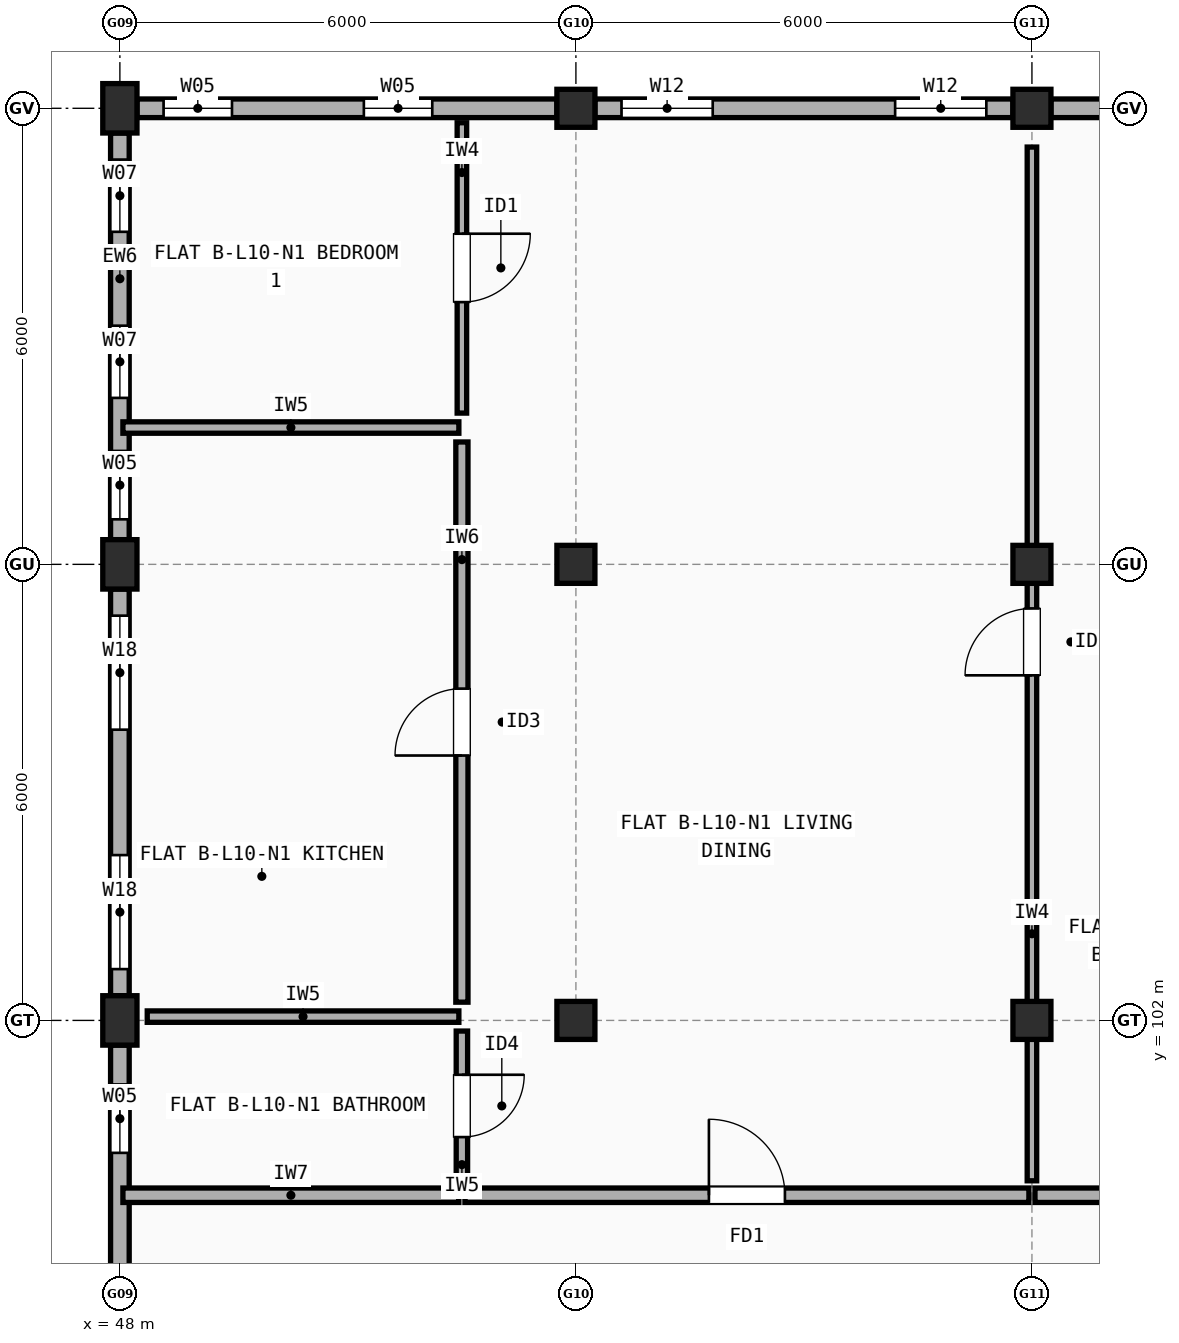
"""IFC4 building model, lengths in metres.
Left out: names, types, materials, properties, quantities, classifications, styles, units other than length and angle.
Written with IfcOpenShell. Run it as: python <this file> out.ifc"""

import sys

from ifc_helpers import new_model, si_unit, direction, frame, frame_2d, origin, origin_2d, place, context, subcontext, project, spatial, rectangle, extrude, element, fill, save


model = new_model("IFC4")
c1 = context("Model", 3, precision=1e-05, world=origin(), true_north=direction((0.0, 1.0)))
c2 = subcontext(c1, "Body", "Model", "MODEL_VIEW")
j1 = project(units=[si_unit("LENGTHUNIT", "METRE"), si_unit("PLANEANGLEUNIT", "RADIAN")], contexts=[c1])
p1 = place(None, origin())
s1 = spatial("IfcSite", under=j1, at=p1, CompositionType="ELEMENT")
p2 = place(p1, origin())
s2 = spatial("IfcBuilding", under=s1, at=p2, CompositionType="ELEMENT")
p3 = place(p2, frame((0.0, 0.0, 33.3)))
s3 = spatial("IfcBuildingStorey", under=s2, at=p3, CompositionType="ELEMENT", Elevation=33.3)
for number, where, z_axis, x_axis in (
    (1, (48.0, 102.0, 0.0), (0.0, 0.0, 1.0), (1.0, 0.0, 0.0)),
    (2, (48.0, 108.0, 0.0), (0.0, 0.0, 1.0), (1.0, 0.0, 0.0)),
    (3, (48.0, 114.0, 0.0), (0.0, 0.0, 1.0), (1.0, 0.0, 0.0)),
):
    element("IfcColumn", number, at=place(p3, frame(where, z_axis=z_axis, x_axis=x_axis)), inside=s3, PredefinedType="COLUMN", context=c2, shape_type="SweptSolid", body=[
        extrude(rectangle(XDim=0.45, YDim=0.65, at=origin_2d()), origin(), (0.0, 0.0, 1.0), 2.99),
    ])
for number, where, z_axis, x_axis in (
    (4, (54.0, 102.0, 0.0), (0.0, 0.0, 1.0), (1.0, 0.0, 0.0)),
    (5, (54.0, 108.0, 0.0), (0.0, 0.0, 1.0), (1.0, 0.0, 0.0)),
    (6, (54.0, 114.0, 0.0), (0.0, 0.0, 1.0), (1.0, 0.0, 0.0)),
    (7, (60.0, 102.0, 0.0), (0.0, 0.0, 1.0), (1.0, 0.0, 0.0)),
    (8, (60.0, 108.0, 0.0), (0.0, 0.0, 1.0), (1.0, 0.0, 0.0)),
    (9, (60.0, 114.0, 0.0), (0.0, 0.0, 1.0), (1.0, 0.0, 0.0)),
):
    element("IfcColumn", number, at=place(p3, frame(where, z_axis=z_axis, x_axis=x_axis)), inside=s3, PredefinedType="COLUMN", context=c2, shape_type="SweptSolid", body=[
        extrude(rectangle(XDim=0.5, YDim=0.5, at=origin_2d()), origin(), (0.0, 0.0, 1.0), 2.99),
    ])
p4 = place(p3, frame((65.75, 114.0, 0.0), z_axis=(0.0, 0.0, 1.0), x_axis=(-1.0, 0.0, 0.0)))
e10 = element("IfcWall", 10, at=p4, inside=s3, PredefinedType="STANDARD", context=c2, shape_type="SweptSolid", body=[
    extrude(rectangle(XDim=5.5, YDim=0.245, at=frame_2d((2.75, 0.0))), origin(), (0.0, 0.0, 1.0), 2.472),
])
p5 = place(p4, frame((0.855, 0.0, 0.9)))
e11 = element("IfcOpeningElement", 11, at=p5, cuts=e10, PredefinedType="OPENING", context=c2, shape_type="SweptSolid", body=[
    extrude(rectangle(XDim=1.0, YDim=1.4, at=frame_2d((0.5, 0.7))), frame((0.0, 0.133, 0.0), z_axis=(0.0, -1.0, 0.0), x_axis=(1.0, 0.0, 0.0)), (0.0, 0.0, 1.0), 0.265),
])
p6 = place(p4, frame((3.62, 0.0, 0.9)))
e12 = element("IfcOpeningElement", 12, at=p6, cuts=e10, PredefinedType="OPENING", context=c2, shape_type="SweptSolid", body=[
    extrude(rectangle(XDim=1.05, YDim=1.35, at=frame_2d((0.525, 0.675))), frame((0.0, 0.133, 0.0), z_axis=(0.0, -1.0, 0.0), x_axis=(1.0, 0.0, 0.0)), (0.0, 0.0, 1.0), 0.265),
])
p7 = place(p3, frame((59.75, 114.0, 0.0), z_axis=(0.0, 0.0, 1.0), x_axis=(-1.0, 0.0, 0.0)))
e13 = element("IfcWall", 13, at=p7, inside=s3, PredefinedType="STANDARD", context=c2, shape_type="SweptSolid", body=[
    extrude(rectangle(XDim=5.5, YDim=0.245, at=frame_2d((2.75, 0.0))), origin(), (0.0, 0.0, 1.0), 2.472),
])
p8 = place(p7, frame((0.35, 0.0, 0.9)))
e14 = element("IfcOpeningElement", 14, at=p8, cuts=e13, PredefinedType="OPENING", context=c2, shape_type="SweptSolid", body=[
    extrude(rectangle(XDim=1.2, YDim=1.35, at=frame_2d((0.6, 0.675))), frame((0.0, 0.133, 0.0), z_axis=(0.0, -1.0, 0.0), x_axis=(1.0, 0.0, 0.0)), (0.0, 0.0, 1.0), 0.265),
])
p9 = place(p7, frame((3.95, 0.0, 0.9)))
e15 = element("IfcOpeningElement", 15, at=p9, cuts=e13, PredefinedType="OPENING", context=c2, shape_type="SweptSolid", body=[
    extrude(rectangle(XDim=1.2, YDim=1.35, at=frame_2d((0.6, 0.675))), frame((0.0, 0.133, 0.0), z_axis=(0.0, -1.0, 0.0), x_axis=(1.0, 0.0, 0.0)), (0.0, 0.0, 1.0), 0.265),
])
p10 = place(p3, frame((53.75, 114.0, 0.0), z_axis=(0.0, 0.0, 1.0), x_axis=(-1.0, 0.0, 0.0)))
e16 = element("IfcWall", 16, at=p10, inside=s3, PredefinedType="STANDARD", context=c2, shape_type="SweptSolid", body=[
    extrude(rectangle(XDim=5.525, YDim=0.245, at=frame_2d((2.762, 0.0))), origin(), (0.0, 0.0, 1.0), 2.472),
])
p11 = place(p10, frame((1.64, 0.0, 0.9)))
e17 = element("IfcOpeningElement", 17, at=p11, cuts=e16, PredefinedType="OPENING", context=c2, shape_type="SweptSolid", body=[
    extrude(rectangle(XDim=0.9, YDim=1.4, at=frame_2d((0.45, 0.7))), frame((0.0, 0.133, 0.0), z_axis=(0.0, -1.0, 0.0), x_axis=(1.0, 0.0, 0.0)), (0.0, 0.0, 1.0), 0.265),
])
p12 = place(p10, frame((4.275, 0.0, 0.9)))
e18 = element("IfcOpeningElement", 18, at=p12, cuts=e16, PredefinedType="OPENING", context=c2, shape_type="SweptSolid", body=[
    extrude(rectangle(XDim=0.9, YDim=1.4, at=frame_2d((0.45, 0.7))), frame((0.0, 0.133, 0.0), z_axis=(0.0, -1.0, 0.0), x_axis=(1.0, 0.0, 0.0)), (0.0, 0.0, 1.0), 0.265),
])
p13 = place(p3, frame((48.0, 113.675, 0.0), z_axis=(0.0, 0.0, 1.0), x_axis=(0.0, -1.0, 0.0)))
e19 = element("IfcWall", 19, at=p13, inside=s3, PredefinedType="STANDARD", context=c2, shape_type="SweptSolid", body=[
    extrude(rectangle(XDim=5.35, YDim=0.245, at=frame_2d((2.675, 0.0))), origin(), (0.0, 0.0, 1.0), 2.472),
])
p14 = place(p13, frame((0.35, 0.0, 0.9)))
e20 = element("IfcOpeningElement", 20, at=p14, cuts=e19, PredefinedType="OPENING", context=c2, shape_type="SweptSolid", body=[
    extrude(rectangle(XDim=0.95, YDim=1.35, at=frame_2d((0.475, 0.675))), frame((0.0, 0.133, 0.0), z_axis=(0.0, -1.0, 0.0), x_axis=(1.0, 0.0, 0.0)), (0.0, 0.0, 1.0), 0.265),
])
p15 = place(p13, frame((2.535, 0.0, 0.9)))
e21 = element("IfcOpeningElement", 21, at=p15, cuts=e19, PredefinedType="OPENING", context=c2, shape_type="SweptSolid", body=[
    extrude(rectangle(XDim=0.95, YDim=1.35, at=frame_2d((0.475, 0.675))), frame((0.0, 0.133, 0.0), z_axis=(0.0, -1.0, 0.0), x_axis=(1.0, 0.0, 0.0)), (0.0, 0.0, 1.0), 0.265),
])
p16 = place(p13, frame((4.183, 0.0, 0.9)))
e22 = element("IfcOpeningElement", 22, at=p16, cuts=e19, PredefinedType="OPENING", context=c2, shape_type="SweptSolid", body=[
    extrude(rectangle(XDim=0.9, YDim=1.4, at=frame_2d((0.45, 0.7))), frame((0.0, 0.133, 0.0), z_axis=(0.0, -1.0, 0.0), x_axis=(1.0, 0.0, 0.0)), (0.0, 0.0, 1.0), 0.265),
])
p17 = place(p3, frame((48.0, 107.675, 0.0), z_axis=(0.0, 0.0, 1.0), x_axis=(0.0, -1.0, 0.0)))
e23 = element("IfcWall", 23, at=p17, inside=s3, PredefinedType="STANDARD", context=c2, shape_type="SweptSolid", body=[
    extrude(rectangle(XDim=5.35, YDim=0.245, at=frame_2d((2.675, 0.0))), origin(), (0.0, 0.0, 1.0), 2.472),
])
p18 = place(p17, frame((0.35, 0.0, 0.9)))
e24 = element("IfcOpeningElement", 24, at=p18, cuts=e23, PredefinedType="OPENING", context=c2, shape_type="SweptSolid", body=[
    extrude(rectangle(XDim=1.5, YDim=1.4, at=frame_2d((0.75, 0.7))), frame((0.0, 0.133, 0.0), z_axis=(0.0, -1.0, 0.0), x_axis=(1.0, 0.0, 0.0)), (0.0, 0.0, 1.0), 0.265),
])
p19 = place(p17, frame((3.5, 0.0, 0.9)))
e25 = element("IfcOpeningElement", 25, at=p19, cuts=e23, PredefinedType="OPENING", context=c2, shape_type="SweptSolid", body=[
    extrude(rectangle(XDim=1.5, YDim=1.4, at=frame_2d((0.75, 0.7))), frame((0.0, 0.133, 0.0), z_axis=(0.0, -1.0, 0.0), x_axis=(1.0, 0.0, 0.0)), (0.0, 0.0, 1.0), 0.265),
])
p20 = place(p3, frame((48.0, 101.675, 0.0), z_axis=(0.0, 0.0, 1.0), x_axis=(0.0, -1.0, 0.0)))
e26 = element("IfcWall", 26, at=p20, inside=s3, PredefinedType="STANDARD", context=c2, shape_type="SweptSolid", body=[
    extrude(rectangle(XDim=5.35, YDim=0.245, at=frame_2d((2.675, 0.0))), origin(), (0.0, 0.0, 1.0), 2.472),
])
p21 = place(p20, frame((0.518, 0.0, 0.9)))
e27 = element("IfcOpeningElement", 27, at=p21, cuts=e26, PredefinedType="OPENING", context=c2, shape_type="SweptSolid", body=[
    extrude(rectangle(XDim=0.9, YDim=1.4, at=frame_2d((0.45, 0.7))), frame((0.0, 0.133, 0.0), z_axis=(0.0, -1.0, 0.0), x_axis=(1.0, 0.0, 0.0)), (0.0, 0.0, 1.0), 0.265),
])
p22 = place(p20, frame((3.183, 0.0, 0.9)))
e28 = element("IfcOpeningElement", 28, at=p22, cuts=e26, PredefinedType="OPENING", context=c2, shape_type="SweptSolid", body=[
    extrude(rectangle(XDim=1.0, YDim=1.4, at=frame_2d((0.5, 0.7))), frame((0.0, 0.133, 0.0), z_axis=(0.0, -1.0, 0.0), x_axis=(1.0, 0.0, 0.0)), (0.0, 0.0, 1.0), 0.265),
])
p23 = place(p3, frame((48.04, 99.7, 0.0), z_axis=(0.0, 0.0, 1.0), x_axis=(1.0, 0.0, 0.0)))
e29 = element("IfcWall", 29, at=p23, inside=s3, PredefinedType="SOLIDWALL", context=c2, shape_type="SweptSolid", body=[
    extrude(rectangle(XDim=4.42, YDim=0.19, at=frame_2d((2.21, 0.0))), origin(), (0.0, 0.0, 1.0), 2.472),
])
p24 = place(p3, frame((52.54, 99.7, 0.0), z_axis=(0.0, 0.0, 1.0), x_axis=(1.0, 0.0, 0.0)))
e30 = element("IfcWall", 30, at=p24, inside=s3, PredefinedType="SOLIDWALL", context=c2, shape_type="SweptSolid", body=[
    extrude(rectangle(XDim=7.42, YDim=0.19, at=frame_2d((3.71, 0.0))), origin(), (0.0, 0.0, 1.0), 2.508),
])
p25 = place(p24, frame((3.21, 0.0, 0.0)))
e31 = element("IfcOpeningElement", 31, at=p25, cuts=e30, PredefinedType="OPENING", context=c2, shape_type="SweptSolid", body=[
    extrude(rectangle(XDim=1.0, YDim=2.15, at=frame_2d((0.5, 1.075))), frame((0.0, 0.105, 0.0), z_axis=(0.0, -1.0, 0.0), x_axis=(1.0, 0.0, 0.0)), (0.0, 0.0, 1.0), 0.21),
])
p26 = place(p3, frame((52.5, 109.99, 0.0), z_axis=(0.0, 0.0, 1.0), x_axis=(0.0, 1.0, 0.0)))
e32 = element("IfcWall", 32, at=p26, inside=s3, PredefinedType="PARTITIONING", context=c2, shape_type="SweptSolid", body=[
    extrude(rectangle(XDim=3.82, YDim=0.125, at=frame_2d((1.91, 0.0))), origin(), (0.0, 0.0, 1.0), 2.99),
])
p27 = place(p26, frame((1.46, 0.0, 0.0)))
e33 = element("IfcOpeningElement", 33, at=p27, cuts=e32, PredefinedType="OPENING", context=c2, shape_type="SweptSolid", body=[
    extrude(rectangle(XDim=0.9, YDim=2.1, at=frame_2d((0.45, 1.05))), frame((0.0, 0.073, 0.0), z_axis=(0.0, -1.0, 0.0), x_axis=(1.0, 0.0, 0.0)), (0.0, 0.0, 1.0), 0.145),
])
p28 = place(p3, frame((52.5, 102.24, 0.0), z_axis=(0.0, 0.0, 1.0), x_axis=(0.0, 1.0, 0.0)))
e34 = element("IfcWall", 34, at=p28, inside=s3, PredefinedType="PLUMBINGWALL", context=c2, shape_type="SweptSolid", body=[
    extrude(rectangle(XDim=7.37, YDim=0.16, at=frame_2d((3.685, 0.0))), origin(), (0.0, 0.0, 1.0), 2.472),
])
p29 = place(p28, frame((3.245, 0.0, 0.0)))
e35 = element("IfcOpeningElement", 35, at=p29, cuts=e34, PredefinedType="OPENING", context=c2, shape_type="SweptSolid", body=[
    extrude(rectangle(XDim=0.88, YDim=2.1, at=frame_2d((0.44, 1.05))), frame((0.0, 0.09, 0.0), z_axis=(0.0, -1.0, 0.0), x_axis=(1.0, 0.0, 0.0)), (0.0, 0.0, 1.0), 0.18),
])
p30 = place(p3, frame((52.5, 99.89, 0.0), z_axis=(0.0, 0.0, 1.0), x_axis=(0.0, 1.0, 0.0)))
e36 = element("IfcWall", 36, at=p30, inside=s3, PredefinedType="PARTITIONING", context=c2, shape_type="SweptSolid", body=[
    extrude(rectangle(XDim=1.97, YDim=0.15, at=frame_2d((0.985, 0.0))), origin(), (0.0, 0.0, 1.0), 2.99),
])
p31 = place(p30, frame((0.575, 0.0, 0.0)))
e37 = element("IfcOpeningElement", 37, at=p31, cuts=e36, PredefinedType="OPENING", context=c2, shape_type="SweptSolid", body=[
    extrude(rectangle(XDim=0.82, YDim=2.08, at=frame_2d((0.41, 1.04))), frame((0.0, 0.085, 0.0), z_axis=(0.0, -1.0, 0.0), x_axis=(1.0, 0.0, 0.0)), (0.0, 0.0, 1.0), 0.17),
])
p32 = place(p3, frame((48.04, 109.8, 0.0), z_axis=(0.0, 0.0, 1.0), x_axis=(1.0, 0.0, 0.0)))
e38 = element("IfcWall", 38, at=p32, inside=s3, PredefinedType="PARTITIONING", context=c2, shape_type="SweptSolid", body=[
    extrude(rectangle(XDim=4.42, YDim=0.15, at=frame_2d((2.21, 0.0))), origin(), (0.0, 0.0, 1.0), 2.472),
])
p33 = place(p3, frame((48.36, 102.05, 0.0), z_axis=(0.0, 0.0, 1.0), x_axis=(1.0, 0.0, 0.0)))
e39 = element("IfcWall", 39, at=p33, inside=s3, PredefinedType="PARTITIONING", context=c2, shape_type="SweptSolid", body=[
    extrude(rectangle(XDim=4.1, YDim=0.15, at=frame_2d((2.05, 0.0))), origin(), (0.0, 0.0, 1.0), 2.472),
])
p34 = place(p3, frame((60.04, 99.7, 0.0), z_axis=(0.0, 0.0, 1.0), x_axis=(1.0, 0.0, 0.0)))
e40 = element("IfcWall", 40, at=p34, inside=s3, PredefinedType="SOLIDWALL", context=c2, shape_type="SweptSolid", body=[
    extrude(rectangle(XDim=2.92, YDim=0.19, at=frame_2d((1.46, 0.0))), origin(), (0.0, 0.0, 1.0), 2.508),
])
p35 = place(p3, frame((60.0, 99.89, 0.0), z_axis=(0.0, 0.0, 1.0), x_axis=(0.0, 1.0, 0.0)))
e41 = element("IfcWall", 41, at=p35, inside=s3, PredefinedType="PARTITIONING", context=c2, shape_type="SweptSolid", body=[
    extrude(rectangle(XDim=13.6, YDim=0.125, at=frame_2d((6.8, 0.0))), origin(), (0.0, 0.0, 1.0), 2.508),
])
p36 = place(p35, frame((6.65, 0.0, 0.0)))
e42 = element("IfcOpeningElement", 42, at=p36, cuts=e41, PredefinedType="OPENING", context=c2, shape_type="SweptSolid", body=[
    extrude(rectangle(XDim=0.88, YDim=2.1, at=frame_2d((0.44, 1.05))), frame((0.0, 0.073, 0.0), z_axis=(0.0, -1.0, 0.0), x_axis=(1.0, 0.0, 0.0)), (0.0, 0.0, 1.0), 0.145),
])
p37 = place(p8, origin())
e43 = element("IfcWindow", 43, at=p37, inside=s3, PartitioningType="SINGLE_PANEL", PredefinedType="WINDOW", context=c2, shape_type="SweptSolid", body=[
    extrude(rectangle(XDim=1.2, YDim=1.35, at=frame_2d((0.6, 0.675))), frame((0.0, 0.03, 0.0), z_axis=(0.0, -1.0, 0.0), x_axis=(1.0, 0.0, 0.0)), (0.0, 0.0, 1.0), 0.06),
])
fill(e14, e43)
p38 = place(p9, origin())
e44 = element("IfcWindow", 44, at=p38, inside=s3, PartitioningType="SINGLE_PANEL", PredefinedType="WINDOW", context=c2, shape_type="SweptSolid", body=[
    extrude(rectangle(XDim=1.2, YDim=1.35, at=frame_2d((0.6, 0.675))), frame((0.0, 0.03, 0.0), z_axis=(0.0, -1.0, 0.0), x_axis=(1.0, 0.0, 0.0)), (0.0, 0.0, 1.0), 0.06),
])
fill(e15, e44)
p39 = place(p11, origin())
e45 = element("IfcWindow", 45, at=p39, inside=s3, PartitioningType="SINGLE_PANEL", PredefinedType="WINDOW", context=c2, shape_type="SweptSolid", body=[
    extrude(rectangle(XDim=0.9, YDim=1.4, at=frame_2d((0.45, 0.7))), frame((0.0, 0.03, 0.0), z_axis=(0.0, -1.0, 0.0), x_axis=(1.0, 0.0, 0.0)), (0.0, 0.0, 1.0), 0.06),
])
fill(e17, e45)
p40 = place(p12, origin())
e46 = element("IfcWindow", 46, at=p40, inside=s3, PartitioningType="SINGLE_PANEL", PredefinedType="WINDOW", context=c2, shape_type="SweptSolid", body=[
    extrude(rectangle(XDim=0.9, YDim=1.4, at=frame_2d((0.45, 0.7))), frame((0.0, 0.03, 0.0), z_axis=(0.0, -1.0, 0.0), x_axis=(1.0, 0.0, 0.0)), (0.0, 0.0, 1.0), 0.06),
])
fill(e18, e46)
p41 = place(p14, origin())
e47 = element("IfcWindow", 47, at=p41, inside=s3, PartitioningType="SINGLE_PANEL", PredefinedType="WINDOW", context=c2, shape_type="SweptSolid", body=[
    extrude(rectangle(XDim=0.95, YDim=1.35, at=frame_2d((0.475, 0.675))), frame((0.0, 0.03, 0.0), z_axis=(0.0, -1.0, 0.0), x_axis=(1.0, 0.0, 0.0)), (0.0, 0.0, 1.0), 0.06),
])
fill(e20, e47)
p42 = place(p15, origin())
e48 = element("IfcWindow", 48, at=p42, inside=s3, PartitioningType="SINGLE_PANEL", PredefinedType="WINDOW", context=c2, shape_type="SweptSolid", body=[
    extrude(rectangle(XDim=0.95, YDim=1.35, at=frame_2d((0.475, 0.675))), frame((0.0, 0.03, 0.0), z_axis=(0.0, -1.0, 0.0), x_axis=(1.0, 0.0, 0.0)), (0.0, 0.0, 1.0), 0.06),
])
fill(e21, e48)
p43 = place(p16, origin())
e49 = element("IfcWindow", 49, at=p43, inside=s3, PartitioningType="SINGLE_PANEL", PredefinedType="WINDOW", context=c2, shape_type="SweptSolid", body=[
    extrude(rectangle(XDim=0.9, YDim=1.4, at=frame_2d((0.45, 0.7))), frame((0.0, 0.03, 0.0), z_axis=(0.0, -1.0, 0.0), x_axis=(1.0, 0.0, 0.0)), (0.0, 0.0, 1.0), 0.06),
])
fill(e22, e49)
p44 = place(p18, origin())
e50 = element("IfcWindow", 50, at=p44, inside=s3, PartitioningType="SINGLE_PANEL", PredefinedType="WINDOW", context=c2, shape_type="SweptSolid", body=[
    extrude(rectangle(XDim=1.5, YDim=1.4, at=frame_2d((0.75, 0.7))), frame((0.0, 0.03, 0.0), z_axis=(0.0, -1.0, 0.0), x_axis=(1.0, 0.0, 0.0)), (0.0, 0.0, 1.0), 0.06),
])
fill(e24, e50)
p45 = place(p19, origin())
e51 = element("IfcWindow", 51, at=p45, inside=s3, PartitioningType="SINGLE_PANEL", PredefinedType="WINDOW", context=c2, shape_type="SweptSolid", body=[
    extrude(rectangle(XDim=1.5, YDim=1.4, at=frame_2d((0.75, 0.7))), frame((0.0, 0.03, 0.0), z_axis=(0.0, -1.0, 0.0), x_axis=(1.0, 0.0, 0.0)), (0.0, 0.0, 1.0), 0.06),
])
fill(e25, e51)
p46 = place(p21, origin())
e52 = element("IfcWindow", 52, at=p46, inside=s3, PartitioningType="SINGLE_PANEL", PredefinedType="WINDOW", context=c2, shape_type="SweptSolid", body=[
    extrude(rectangle(XDim=0.9, YDim=1.4, at=frame_2d((0.45, 0.7))), frame((0.0, 0.03, 0.0), z_axis=(0.0, -1.0, 0.0), x_axis=(1.0, 0.0, 0.0)), (0.0, 0.0, 1.0), 0.06),
])
fill(e27, e52)
p47 = place(p25, origin())
e53 = element("IfcDoor", 53, at=p47, inside=s3, OperationType="SINGLE_SWING_LEFT", PredefinedType="DOOR", context=c2, shape_type="SweptSolid", body=[
    extrude(rectangle(XDim=1.0, YDim=2.15, at=frame_2d((0.5, 1.075))), frame((0.0, 0.025, 0.0), z_axis=(0.0, -1.0, 0.0), x_axis=(1.0, 0.0, 0.0)), (0.0, 0.0, 1.0), 0.05),
])
fill(e31, e53)
p48 = place(p27, origin())
e54 = element("IfcDoor", 54, at=p48, inside=s3, OperationType="SINGLE_SWING_RIGHT", PredefinedType="DOOR", context=c2, shape_type="SweptSolid", body=[
    extrude(rectangle(XDim=0.9, YDim=2.1, at=frame_2d((0.45, 1.05))), frame((0.0, 0.025, 0.0), z_axis=(0.0, -1.0, 0.0), x_axis=(1.0, 0.0, 0.0)), (0.0, 0.0, 1.0), 0.05),
])
fill(e33, e54)
p49 = place(p29, origin())
e55 = element("IfcDoor", 55, at=p49, inside=s3, OperationType="SINGLE_SWING_LEFT", PredefinedType="DOOR", context=c2, shape_type="SweptSolid", body=[
    extrude(rectangle(XDim=0.88, YDim=2.1, at=frame_2d((0.44, 1.05))), frame((0.0, 0.025, 0.0), z_axis=(0.0, -1.0, 0.0), x_axis=(1.0, 0.0, 0.0)), (0.0, 0.0, 1.0), 0.05),
])
fill(e35, e55)
p50 = place(p31, origin())
e56 = element("IfcDoor", 56, at=p50, inside=s3, OperationType="SINGLE_SWING_RIGHT", PredefinedType="DOOR", context=c2, shape_type="SweptSolid", body=[
    extrude(rectangle(XDim=0.82, YDim=2.08, at=frame_2d((0.41, 1.04))), frame((0.0, 0.025, 0.0), z_axis=(0.0, -1.0, 0.0), x_axis=(1.0, 0.0, 0.0)), (0.0, 0.0, 1.0), 0.05),
])
fill(e37, e56)
p51 = place(p36, origin())
e57 = element("IfcDoor", 57, at=p51, inside=s3, OperationType="SINGLE_SWING_LEFT", PredefinedType="DOOR", context=c2, shape_type="SweptSolid", body=[
    extrude(rectangle(XDim=0.88, YDim=2.1, at=frame_2d((0.44, 1.05))), frame((0.0, 0.025, 0.0), z_axis=(0.0, -1.0, 0.0), x_axis=(1.0, 0.0, 0.0)), (0.0, 0.0, 1.0), 0.05),
])
fill(e42, e57)
save(model, sys.argv[1])
